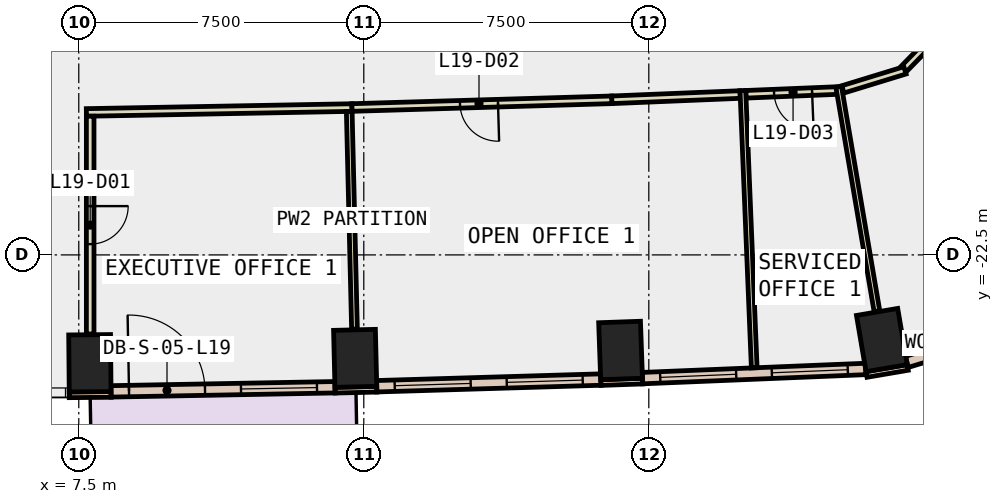
"""IFC4 building model, lengths in metres.
Left out: names, types, materials, properties, quantities, classifications, styles, units other than length and angle.
Written with IfcOpenShell. Run it as: python <this file> out.ifc"""

import sys

from ifc_helpers import new_model, si_unit, direction, frame, frame_2d, origin, origin_2d, place, context, subcontext, project, spatial, rectangle, extrude, element, fill, save


model = new_model("IFC4")
c1 = context("Model", 3, precision=1e-05, world=origin(), true_north=direction((0.0, 1.0)))
c2 = subcontext(c1, "Body", "Model", "MODEL_VIEW")
j1 = project(units=[si_unit("LENGTHUNIT", "METRE"), si_unit("PLANEANGLEUNIT", "RADIAN")], contexts=[c1])
p1 = place(None, origin())
s1 = spatial("IfcSite", under=j1, at=p1, CompositionType="ELEMENT")
p2 = place(p1, origin())
s2 = spatial("IfcBuilding", under=s1, at=p2, CompositionType="ELEMENT")
p3 = place(p2, frame((0.0, 0.0, 90.8)))
s3 = spatial("IfcBuildingStorey", under=s2, at=p3, CompositionType="ELEMENT", Elevation=90.8)
for number, where, z_axis, x_axis in (
    (1, (7.792, -25.351, -0.4), (0.0, 0.0, 1.0), (1.0, 0.009, 0.0)),
    (2, (14.773, -25.222, -0.4), (0.0, 0.0, 1.0), (1.0, 0.024, 0.0)),
    (3, (21.757, -25.015, -0.4), (0.0, 0.0, 1.0), (0.999, 0.035, 0.0)),
    (4, (28.633, -24.74, -0.4), (0.0, 0.0, 1.0), (0.986, 0.168, 0.0)),
):
    element("IfcColumn", number, at=place(p3, frame(where, z_axis=z_axis, x_axis=x_axis)), inside=s3, PredefinedType="COLUMN", context=c2, shape_type="SweptSolid", body=[
        extrude(rectangle(XDim=1.1, YDim=1.5, at=origin_2d()), origin(), (0.0, 0.0, 1.0), 4.2),
    ])
p4 = place(p3, frame((7.249, -26.181, 0.0), z_axis=(0.0, 0.0, 1.0), x_axis=(0.99995860686, 0.009098602504, 0.0)))
e5 = element("IfcWall", 5, at=p4, inside=s3, PredefinedType="STANDARD", context=c2, shape_type="SweptSolid", body=[
    extrude(rectangle(XDim=1.1, YDim=0.15, at=frame_2d((0.55, 0.0))), origin(), (0.0, 0.0, 1.0), 3.8),
])
p5 = place(p3, frame((14.243, -26.06, 0.0), z_axis=(0.0, 0.0, 1.0), x_axis=(0.999718180159, 0.023739424163, 0.0)))
e6 = element("IfcWall", 6, at=p5, inside=s3, PredefinedType="STANDARD", context=c2, shape_type="SweptSolid", body=[
    extrude(rectangle(XDim=1.1, YDim=0.15, at=frame_2d((0.55, 0.0))), origin(), (0.0, 0.0, 1.0), 3.8),
])
p6 = place(p3, frame((21.237, -25.859, 0.0), z_axis=(0.0, 0.0, 1.0), x_axis=(0.999376638472, 0.035303462679, 0.0)))
e7 = element("IfcWall", 7, at=p6, inside=s3, PredefinedType="STANDARD", context=c2, shape_type="SweptSolid", body=[
    extrude(rectangle(XDim=1.1, YDim=0.15, at=frame_2d((0.55, 0.0))), origin(), (0.0, 0.0, 1.0), 3.8),
])
p7 = place(p3, frame((28.229, -25.646, 0.0), z_axis=(0.0, 0.0, 1.0), x_axis=(0.985763338892, 0.168138751323, 0.0)))
e8 = element("IfcWall", 8, at=p7, inside=s3, PredefinedType="STANDARD", context=c2, shape_type="SweptSolid", body=[
    extrude(rectangle(XDim=1.101, YDim=0.15, at=frame_2d((0.55, 0.0))), origin(), (0.0, 0.0, 1.0), 3.8),
])
p8 = place(p3, frame((8.348, -26.091, 0.0), z_axis=(0.0, 0.0, 1.0), x_axis=(0.999828633111, 0.018512277318, 0.0)))
e9 = element("IfcWall", 9, at=p8, inside=s3, PredefinedType="STANDARD", context=c2, shape_type="SweptSolid", body=[
    extrude(rectangle(XDim=5.895, YDim=0.3, at=frame_2d((2.948, 0.0))), origin(), (0.0, 0.0, 1.0), 3.8),
])
p9 = place(p8, frame((0.474, 0.0, 0.0)))
e10 = element("IfcOpeningElement", 10, at=p9, cuts=e9, PredefinedType="OPENING", context=c2, shape_type="SweptSolid", body=[
    extrude(rectangle(XDim=2.0, YDim=2.4, at=frame_2d((1.0, 1.2))), frame((0.0, 0.16, 0.0), z_axis=(0.0, -1.0, 0.0), x_axis=(1.0, 0.0, 0.0)), (0.0, 0.0, 1.0), 0.32),
])
p10 = place(p8, frame((3.421, 0.0, 0.9)))
e11 = element("IfcOpeningElement", 11, at=p10, cuts=e9, PredefinedType="OPENING", context=c2, shape_type="SweptSolid", body=[
    extrude(rectangle(XDim=2.0, YDim=2.6, at=frame_2d((1.0, 1.3))), frame((0.0, 0.16, 0.0), z_axis=(0.0, -1.0, 0.0), x_axis=(1.0, 0.0, 0.0)), (0.0, 0.0, 1.0), 0.32),
])
p11 = place(p3, frame((15.34, -25.956, 0.0), z_axis=(0.0, 0.0, 1.0), x_axis=(0.999554487555, 0.029846715213, 0.0)))
e12 = element("IfcWall", 12, at=p11, inside=s3, PredefinedType="STANDARD", context=c2, shape_type="SweptSolid", body=[
    extrude(rectangle(XDim=5.898, YDim=0.3, at=frame_2d((2.949, 0.0))), origin(), (0.0, 0.0, 1.0), 3.8),
])
p12 = place(p11, frame((0.474, 0.0, 0.9)))
e13 = element("IfcOpeningElement", 13, at=p12, cuts=e12, PredefinedType="OPENING", context=c2, shape_type="SweptSolid", body=[
    extrude(rectangle(XDim=2.0, YDim=2.6, at=frame_2d((1.0, 1.3))), frame((0.0, 0.16, 0.0), z_axis=(0.0, -1.0, 0.0), x_axis=(1.0, 0.0, 0.0)), (0.0, 0.0, 1.0), 0.32),
])
p13 = place(p11, frame((3.423, 0.0, 0.9)))
e14 = element("IfcOpeningElement", 14, at=p13, cuts=e12, PredefinedType="OPENING", context=c2, shape_type="SweptSolid", body=[
    extrude(rectangle(XDim=2.0, YDim=2.6, at=frame_2d((1.0, 1.3))), frame((0.0, 0.16, 0.0), z_axis=(0.0, -1.0, 0.0), x_axis=(1.0, 0.0, 0.0)), (0.0, 0.0, 1.0), 0.32),
])
p14 = place(p3, frame((22.332, -25.742, 0.0), z_axis=(0.0, 0.0, 1.0), x_axis=(0.999159360905, 0.040994774244, 0.0)))
e15 = element("IfcWall", 15, at=p14, inside=s3, PredefinedType="STANDARD", context=c2, shape_type="SweptSolid", body=[
    extrude(rectangle(XDim=5.878, YDim=0.3, at=frame_2d((2.939, 0.0))), origin(), (0.0, 0.0, 1.0), 3.8),
])
p15 = place(p14, frame((0.469, 0.0, 0.9)))
e16 = element("IfcOpeningElement", 16, at=p15, cuts=e15, PredefinedType="OPENING", context=c2, shape_type="SweptSolid", body=[
    extrude(rectangle(XDim=2.0, YDim=2.6, at=frame_2d((1.0, 1.3))), frame((0.0, 0.16, 0.0), z_axis=(0.0, -1.0, 0.0), x_axis=(1.0, 0.0, 0.0)), (0.0, 0.0, 1.0), 0.32),
])
p16 = place(p14, frame((3.408, 0.0, 0.9)))
e17 = element("IfcOpeningElement", 17, at=p16, cuts=e15, PredefinedType="OPENING", context=c2, shape_type="SweptSolid", body=[
    extrude(rectangle(XDim=2.0, YDim=2.6, at=frame_2d((1.0, 1.3))), frame((0.0, 0.16, 0.0), z_axis=(0.0, -1.0, 0.0), x_axis=(1.0, 0.0, 0.0)), (0.0, 0.0, 1.0), 0.32),
])
p17 = place(p3, frame((29.288, -25.316, 0.0), z_axis=(0.0, 0.0, 1.0), x_axis=(0.956317661006, 0.292329490895, 0.0)))
e18 = element("IfcWall", 18, at=p17, inside=s3, PredefinedType="STANDARD", context=c2, shape_type="SweptSolid", body=[
    extrude(rectangle(XDim=3.41, YDim=0.3, at=frame_2d((1.705, 0.0))), origin(), (0.0, 0.0, 1.0), 3.8),
])
p18 = place(p17, frame((1.005, 0.0, 0.9)))
e19 = element("IfcOpeningElement", 19, at=p18, cuts=e18, PredefinedType="OPENING", context=c2, shape_type="SweptSolid", body=[
    extrude(rectangle(XDim=1.4, YDim=2.6, at=frame_2d((0.7, 1.3))), frame((0.0, 0.16, 0.0), z_axis=(0.0, -1.0, 0.0), x_axis=(1.0, 0.0, 0.0)), (0.0, 0.0, 1.0), 0.32),
])
p19 = place(p3, frame((14.689, -18.623, 0.0), z_axis=(0.0, 0.0, 1.0), x_axis=(-0.99982995049, -0.01844098976, 0.0)))
e20 = element("IfcWall", 20, at=p19, inside=s3, PredefinedType="PARTITIONING", context=c2, shape_type="SweptSolid", body=[
    extrude(rectangle(XDim=6.99, YDim=0.2, at=frame_2d((3.495, 0.0))), origin(), (0.0, 0.0, 1.0), 3.8),
])
p20 = place(p3, frame((24.904, -18.28, 0.0), z_axis=(0.0, 0.0, 1.0), x_axis=(-0.999156550882, -0.041063205305, 0.0)))
e21 = element("IfcWall", 21, at=p20, inside=s3, PredefinedType="PARTITIONING", context=c2, shape_type="SweptSolid", body=[
    extrude(rectangle(XDim=3.383, YDim=0.2, at=frame_2d((1.691, 0.0))), origin(), (0.0, 0.0, 1.0), 3.8),
])
p21 = place(p3, frame((21.524, -18.419, 0.0), z_axis=(0.0, 0.0, 1.0), x_axis=(-0.999558696746, -0.029705416334, 0.0)))
e22 = element("IfcWall", 22, at=p21, inside=s3, PredefinedType="PARTITIONING", context=c2, shape_type="SweptSolid", body=[
    extrude(rectangle(XDim=6.838, YDim=0.2, at=frame_2d((3.419, 0.0))), origin(), (0.0, 0.0, 1.0), 3.8),
])
p22 = place(p21, frame((2.994, 0.0, 0.0)))
e23 = element("IfcOpeningElement", 23, at=p22, cuts=e22, PredefinedType="OPENING", context=c2, shape_type="SweptSolid", body=[
    extrude(rectangle(XDim=1.0, YDim=2.1, at=frame_2d((0.5, 1.05))), frame((0.0, 0.11, 0.0), z_axis=(0.0, -1.0, 0.0), x_axis=(1.0, 0.0, 0.0)), (0.0, 0.0, 1.0), 0.22),
])
p23 = place(p3, frame((27.538, -18.172, 0.0), z_axis=(0.0, 0.0, 1.0), x_axis=(-0.999161261417, -0.040948427126, 0.0)))
e24 = element("IfcWall", 24, at=p23, inside=s3, PredefinedType="PARTITIONING", context=c2, shape_type="SweptSolid", body=[
    extrude(rectangle(XDim=2.486, YDim=0.2, at=frame_2d((1.243, 0.0))), origin(), (0.0, 0.0, 1.0), 3.8),
])
p24 = place(p23, frame((0.743, 0.0, 0.0)))
e25 = element("IfcOpeningElement", 25, at=p24, cuts=e24, PredefinedType="OPENING", context=c2, shape_type="SweptSolid", body=[
    extrude(rectangle(XDim=1.0, YDim=2.1, at=frame_2d((0.5, 1.05))), frame((0.0, 0.11, 0.0), z_axis=(0.0, -1.0, 0.0), x_axis=(1.0, 0.0, 0.0)), (0.0, 0.0, 1.0), 0.22),
])
p25 = place(p3, frame((29.743, -17.061, 0.0), z_axis=(0.0, 0.0, 1.0), x_axis=(-0.698331924638, -0.715774072617, 0.0)))
e26 = element("IfcWall", 26, at=p25, inside=s3, PredefinedType="PARTITIONING", context=c2, shape_type="SweptSolid", body=[
    extrude(rectangle(XDim=0.756, YDim=0.2, at=frame_2d((0.378, 0.0))), origin(), (0.0, 0.0, 1.0), 3.8),
])
p26 = place(p3, frame((29.24, -17.644, 0.0), z_axis=(0.0, 0.0, 1.0), x_axis=(-0.956137025409, -0.292919764852, 0.0)))
e27 = element("IfcWall", 27, at=p26, inside=s3, PredefinedType="PARTITIONING", context=c2, shape_type="SweptSolid", body=[
    extrude(rectangle(XDim=1.707, YDim=0.2, at=frame_2d((0.854, 0.0))), origin(), (0.0, 0.0, 1.0), 3.8),
])
p27 = place(p3, frame((7.8, -18.85, 0.0), z_axis=(0.0, 0.0, 1.0), x_axis=(0.0, -1.0, 0.0)))
e28 = element("IfcWall", 28, at=p27, inside=s3, PredefinedType="PARTITIONING", context=c2, shape_type="SweptSolid", body=[
    extrude(rectangle(XDim=5.731, YDim=0.2, at=frame_2d((2.865, 0.0))), origin(), (0.0, 0.0, 1.0), 3.8),
])
p28 = place(p27, frame((2.366, 0.0, 0.0)))
e29 = element("IfcOpeningElement", 29, at=p28, cuts=e28, PredefinedType="OPENING", context=c2, shape_type="SweptSolid", body=[
    extrude(rectangle(XDim=1.0, YDim=2.1, at=frame_2d((0.5, 1.05))), frame((0.0, 0.11, 0.0), z_axis=(0.0, -1.0, 0.0), x_axis=(1.0, 0.0, 0.0)), (0.0, 0.0, 1.0), 0.22),
])
p29 = place(p3, frame((14.617, -18.724, 0.0), z_axis=(0.0, 0.0, 1.0), x_axis=(0.02407553942, -0.999710142192, 0.0)))
e30 = element("IfcWall", 30, at=p29, inside=s3, PredefinedType="PARTITIONING", context=c2, shape_type="SweptSolid", body=[
    extrude(rectangle(XDim=5.729, YDim=0.15, at=frame_2d((2.865, 0.0))), origin(), (0.0, 0.0, 1.0), 3.8),
])
p30 = place(p3, frame((24.975, -18.177, 0.0), z_axis=(0.0, 0.0, 1.0), x_axis=(0.040934999913, -0.999161811611, 0.0)))
e31 = element("IfcWall", 31, at=p30, inside=s3, PredefinedType="PARTITIONING", context=c2, shape_type="SweptSolid", body=[
    extrude(rectangle(XDim=7.3, YDim=0.15, at=frame_2d((3.65, 0.0))), origin(), (0.0, 0.0, 1.0), 3.8),
])
p31 = place(p3, frame((27.496, -18.074, 0.0), z_axis=(0.0, 0.0, 1.0), x_axis=(0.168025125373, -0.985782712997, 0.0)))
e32 = element("IfcWall", 32, at=p31, inside=s3, PredefinedType="PARTITIONING", context=c2, shape_type="SweptSolid", body=[
    extrude(rectangle(XDim=5.992, YDim=0.15, at=frame_2d((2.996, 0.0))), origin(), (0.0, 0.0, 1.0), 3.8),
])
p32 = place(p9, origin())
e33 = element("IfcDoor", 33, at=p32, inside=s3, OperationType="SLIDING_TO_LEFT", PredefinedType="DOOR", context=c2, shape_type="SweptSolid", body=[
    extrude(rectangle(XDim=2.0, YDim=2.4, at=frame_2d((1.0, 1.2))), frame((0.0, 0.025, 0.0), z_axis=(0.0, -1.0, 0.0), x_axis=(1.0, 0.0, 0.0)), (0.0, 0.0, 1.0), 0.05),
])
fill(e10, e33)
p33 = place(p10, origin())
e34 = element("IfcWindow", 34, at=p33, inside=s3, PartitioningType="SINGLE_PANEL", PredefinedType="WINDOW", context=c2, shape_type="SweptSolid", body=[
    extrude(rectangle(XDim=2.0, YDim=2.6, at=frame_2d((1.0, 1.3))), frame((0.0, 0.03, 0.0), z_axis=(0.0, -1.0, 0.0), x_axis=(1.0, 0.0, 0.0)), (0.0, 0.0, 1.0), 0.06),
])
fill(e11, e34)
p34 = place(p12, origin())
e35 = element("IfcWindow", 35, at=p34, inside=s3, PartitioningType="SINGLE_PANEL", PredefinedType="WINDOW", context=c2, shape_type="SweptSolid", body=[
    extrude(rectangle(XDim=2.0, YDim=2.6, at=frame_2d((1.0, 1.3))), frame((0.0, 0.03, 0.0), z_axis=(0.0, -1.0, 0.0), x_axis=(1.0, 0.0, 0.0)), (0.0, 0.0, 1.0), 0.06),
])
fill(e13, e35)
p35 = place(p13, origin())
e36 = element("IfcWindow", 36, at=p35, inside=s3, PartitioningType="SINGLE_PANEL", PredefinedType="WINDOW", context=c2, shape_type="SweptSolid", body=[
    extrude(rectangle(XDim=2.0, YDim=2.6, at=frame_2d((1.0, 1.3))), frame((0.0, 0.03, 0.0), z_axis=(0.0, -1.0, 0.0), x_axis=(1.0, 0.0, 0.0)), (0.0, 0.0, 1.0), 0.06),
])
fill(e14, e36)
p36 = place(p15, origin())
e37 = element("IfcWindow", 37, at=p36, inside=s3, PartitioningType="SINGLE_PANEL", PredefinedType="WINDOW", context=c2, shape_type="SweptSolid", body=[
    extrude(rectangle(XDim=2.0, YDim=2.6, at=frame_2d((1.0, 1.3))), frame((0.0, 0.03, 0.0), z_axis=(0.0, -1.0, 0.0), x_axis=(1.0, 0.0, 0.0)), (0.0, 0.0, 1.0), 0.06),
])
fill(e16, e37)
p37 = place(p16, origin())
e38 = element("IfcWindow", 38, at=p37, inside=s3, PartitioningType="SINGLE_PANEL", PredefinedType="WINDOW", context=c2, shape_type="SweptSolid", body=[
    extrude(rectangle(XDim=2.0, YDim=2.6, at=frame_2d((1.0, 1.3))), frame((0.0, 0.03, 0.0), z_axis=(0.0, -1.0, 0.0), x_axis=(1.0, 0.0, 0.0)), (0.0, 0.0, 1.0), 0.06),
])
fill(e17, e38)
p38 = place(p28, origin())
e39 = element("IfcDoor", 39, at=p38, inside=s3, OperationType="SINGLE_SWING_LEFT", PredefinedType="DOOR", context=c2, shape_type="SweptSolid", body=[
    extrude(rectangle(XDim=1.0, YDim=2.1, at=frame_2d((0.5, 1.05))), frame((0.0, 0.025, 0.0), z_axis=(0.0, -1.0, 0.0), x_axis=(1.0, 0.0, 0.0)), (0.0, 0.0, 1.0), 0.05),
])
fill(e29, e39)
p39 = place(p22, origin())
e40 = element("IfcDoor", 40, at=p39, inside=s3, OperationType="SINGLE_SWING_LEFT", PredefinedType="DOOR", context=c2, shape_type="SweptSolid", body=[
    extrude(rectangle(XDim=1.0, YDim=2.1, at=frame_2d((0.5, 1.05))), frame((0.0, 0.025, 0.0), z_axis=(0.0, -1.0, 0.0), x_axis=(1.0, 0.0, 0.0)), (0.0, 0.0, 1.0), 0.05),
])
fill(e23, e40)
p40 = place(p24, origin())
e41 = element("IfcDoor", 41, at=p40, inside=s3, OperationType="SINGLE_SWING_LEFT", PredefinedType="DOOR", context=c2, shape_type="SweptSolid", body=[
    extrude(rectangle(XDim=1.0, YDim=2.1, at=frame_2d((0.5, 1.05))), frame((0.0, 0.025, 0.0), z_axis=(0.0, -1.0, 0.0), x_axis=(1.0, 0.0, 0.0)), (0.0, 0.0, 1.0), 0.05),
])
fill(e25, e41)
save(model, sys.argv[1])
